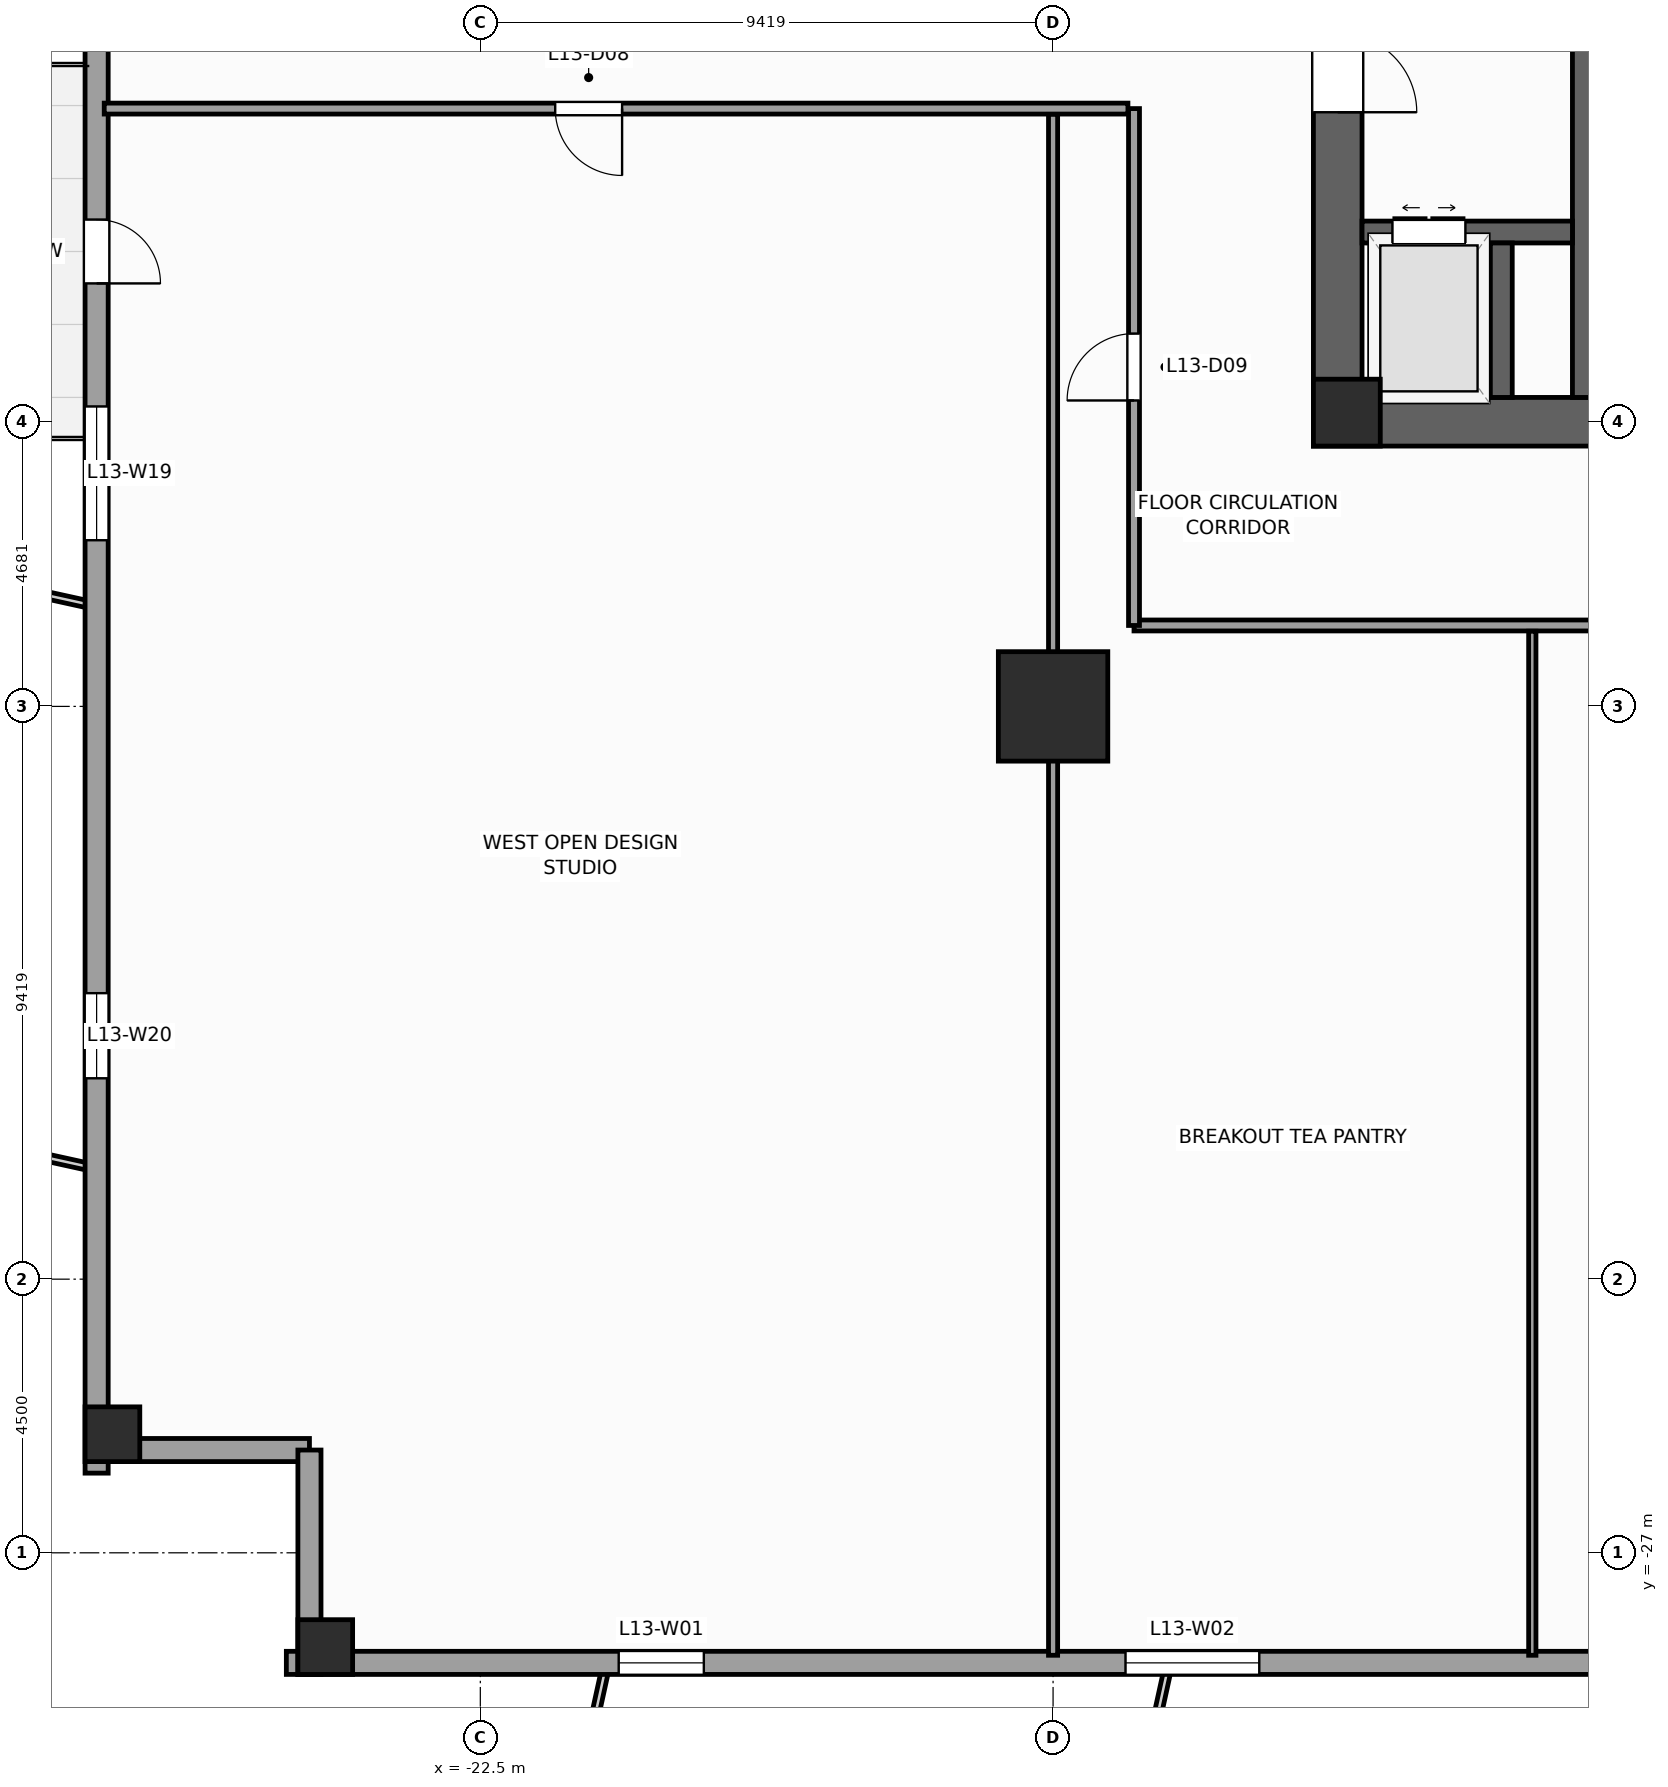
"""IFC4 building model, lengths in metres.
Left out: names, types, materials, properties, quantities, classifications, styles, units other than length and angle.
Written with IfcOpenShell. Run it as: python <this file> out.ifc"""

import sys

from ifc_helpers import new_model, si_unit, direction, frame, frame_2d, origin, origin_2d, place, context, subcontext, project, spatial, rectangle, extrude, source, transform, mapped, element, fill, save


model = new_model("IFC4")
c1 = context("Model", 3, precision=1e-05, world=origin(), true_north=direction((0.0, 1.0)))
c2 = subcontext(c1, "Body", "Model", "MODEL_VIEW")
j1 = project(units=[si_unit("LENGTHUNIT", "METRE"), si_unit("PLANEANGLEUNIT", "RADIAN")], contexts=[c1])
p1 = place(None, origin())
s1 = spatial("IfcSite", under=j1, at=p1, CompositionType="ELEMENT")
p2 = place(p1, origin())
s2 = spatial("IfcBuilding", under=s1, at=p2, CompositionType="ELEMENT")
p3 = place(p2, frame((0.0, 0.0, 58.0)))
s3 = spatial("IfcBuildingStorey", under=s2, at=p3, CompositionType="ELEMENT", Elevation=58.0)
p4 = place(p3, frame((-8.8, -8.4, 0.0), z_axis=(0.0, 0.0, 1.0), x_axis=(1.0, 0.0, 0.0)))
e1 = element("IfcWall", 1, at=p4, inside=s3, PredefinedType="SHEAR", context=c2, shape_type="SweptSolid", body=[
    extrude(rectangle(XDim=17.6, YDim=0.8, at=frame_2d((8.8, 0.0))), origin(), (0.0, 0.0, 1.0), 4.0),
])
p5 = place(p4, frame((8.15, 0.0, 0.0)))
e2 = element("IfcOpeningElement", 2, at=p5, cuts=e1, PredefinedType="OPENING", context=c2, shape_type="SweptSolid", body=[
    extrude(rectangle(XDim=1.3, YDim=2.2, at=frame_2d((0.65, 1.1))), frame((0.0, 0.41, 0.0), z_axis=(0.0, -1.0, 0.0), x_axis=(1.0, 0.0, 0.0)), (0.0, 0.0, 1.0), 0.82),
])
p6 = place(p3, frame((-8.4, -8.0, 0.0), z_axis=(0.0, 0.0, 1.0), x_axis=(0.0, 1.0, 0.0)))
e3 = element("IfcWall", 3, at=p6, inside=s3, PredefinedType="SHEAR", context=c2, shape_type="SweptSolid", body=[
    extrude(rectangle(XDim=16.0, YDim=0.8, at=frame_2d((8.0, 0.0))), origin(), (0.0, 0.0, 1.0), 4.0),
])
p7 = place(p6, frame((4.69, 0.0, 0.0)))
e4 = element("IfcOpeningElement", 4, at=p7, cuts=e3, PredefinedType="OPENING", context=c2, shape_type="SweptSolid", body=[
    extrude(rectangle(XDim=1.3, YDim=2.2, at=frame_2d((0.65, 1.1))), frame((0.0, 0.41, 0.0), z_axis=(0.0, -1.0, 0.0), x_axis=(1.0, 0.0, 0.0)), (0.0, 0.0, 1.0), 0.82),
])
p8 = place(p3, frame((-4.36, -8.0, 0.0), z_axis=(0.0, 0.0, 1.0), x_axis=(0.0, 1.0, 0.0)))
e5 = element("IfcWall", 5, at=p8, inside=s3, PredefinedType="SHEAR", context=c2, shape_type="SweptSolid", body=[
    extrude(rectangle(XDim=16.0, YDim=0.36, at=frame_2d((8.0, 0.0))), origin(), (0.0, 0.0, 1.0), 4.0),
])
p9 = place(p3, frame((-8.0, -5.28, 0.0), z_axis=(0.0, 0.0, 1.0), x_axis=(1.0, 0.0, 0.0)))
e6 = element("IfcWall", 6, at=p9, inside=s3, PredefinedType="SHEAR", context=c2, shape_type="SweptSolid", body=[
    extrude(rectangle(XDim=3.46, YDim=0.36, at=frame_2d((1.73, 0.0))), origin(), (0.0, 0.0, 1.0), 4.0),
])
p10 = place(p9, frame((0.5, 0.0, 0.0)))
e7 = element("IfcOpeningElement", 7, at=p10, cuts=e6, PredefinedType="OPENING", context=c2, shape_type="SweptSolid", body=[
    extrude(rectangle(XDim=1.2, YDim=2.25, at=frame_2d((0.6, 1.125))), frame((0.0, 0.19, 0.0), z_axis=(0.0, -1.0, 0.0), x_axis=(1.0, 0.0, 0.0)), (0.0, 0.0, 1.0), 0.38),
])
p11 = place(p3, frame((-5.71, -8.0, 0.0), z_axis=(0.0, 0.0, 1.0), x_axis=(0.0, 1.0, 0.0)))
e8 = element("IfcWall", 8, at=p11, inside=s3, PredefinedType="SHEAR", context=c2, shape_type="SweptSolid", body=[
    extrude(rectangle(XDim=2.54, YDim=0.36, at=frame_2d((1.27, 0.0))), origin(), (0.0, 0.0, 1.0), 4.0),
])
m1 = source(origin(), c2, "Body", "SweptSolid", [
    extrude(rectangle(XDim=1.1, YDim=1.1, at=origin_2d()), origin(), (0.0, 0.0, 1.0), 4.0),
])
p12 = place(p3, frame((-8.25, -8.25, 0.0), z_axis=(0.0, 0.0, 1.0), x_axis=(1.0, 0.0, 0.0)))
e9 = element("IfcColumn", 9, at=p12, inside=s3, PredefinedType="PILASTER", context=c2, shape_type="MappedRepresentation", body=[
    mapped(m1, transform((0.0, 0.0, 0.0), scale=1.0)),
])
m2 = source(origin(), c2, "Body", "SweptSolid", [
    extrude(rectangle(XDim=1.8, YDim=1.8, at=origin_2d()), origin(), (0.0, 0.0, 1.0), 4.0),
])
p13 = place(p3, frame((-13.081, -13.081, 0.0), z_axis=(0.0, 0.0, 1.0), x_axis=(1.0, 0.0, 0.0)))
e10 = element("IfcColumn", 10, at=p13, inside=s3, PredefinedType="COLUMN", context=c2, shape_type="MappedRepresentation", body=[
    mapped(m2, transform((0.0, 0.0, 0.0), scale=1.0)),
])
m3 = source(origin(), c2, "Body", "SweptSolid", [
    extrude(rectangle(XDim=0.9, YDim=0.9, at=origin_2d()), origin(), (0.0, 0.0, 1.0), 4.0),
])
for number, where, z_axis, x_axis in (
    (11, (-25.05, -28.55, 0.0), (0.0, 0.0, 1.0), (1.0, 0.0, 0.0)),
    (12, (-28.55, -25.05, 0.0), (0.0, 0.0, 1.0), (1.0, 0.0, 0.0)),
):
    element("IfcColumn", number, at=place(p3, frame(where, z_axis=z_axis, x_axis=x_axis)), inside=s3, PredefinedType="COLUMN", context=c2, shape_type="MappedRepresentation", body=[
        mapped(m3, transform((0.0, 0.0, 0.0), scale=1.0)),
    ])
p14 = place(p3, frame((-25.69, -28.81, 0.0), z_axis=(0.0, 0.0, 1.0), x_axis=(1.0, 0.0, 0.0)))
e13 = element("IfcWall", 13, at=p14, inside=s3, PredefinedType="STANDARD", context=c2, shape_type="SweptSolid", body=[
    extrude(rectangle(XDim=51.38, YDim=0.38, at=frame_2d((25.69, 0.0))), origin(), (0.0, 0.0, 1.0), 3.12),
])
p15 = place(p14, frame((5.466, 0.0, 0.49)))
e14 = element("IfcOpeningElement", 14, at=p15, cuts=e13, PredefinedType="OPENING", context=c2, shape_type="SweptSolid", body=[
    extrude(rectangle(XDim=1.4, YDim=2.4, at=frame_2d((0.7, 1.2))), frame((0.0, 0.2, 0.0), z_axis=(0.0, -1.0, 0.0), x_axis=(1.0, 0.0, 0.0)), (0.0, 0.0, 1.0), 0.4),
])
p16 = place(p14, frame((13.8, 0.0, 0.49)))
e15 = element("IfcOpeningElement", 15, at=p16, cuts=e13, PredefinedType="OPENING", context=c2, shape_type="SweptSolid", body=[
    extrude(rectangle(XDim=2.2, YDim=2.4, at=frame_2d((1.1, 1.2))), frame((0.0, 0.2, 0.0), z_axis=(0.0, -1.0, 0.0), x_axis=(1.0, 0.0, 0.0)), (0.0, 0.0, 1.0), 0.4),
])
p17 = place(p14, frame((22.062, 0.0, 0.49)))
e16 = element("IfcOpeningElement", 16, at=p17, cuts=e13, PredefinedType="OPENING", context=c2, shape_type="SweptSolid", body=[
    extrude(rectangle(XDim=2.2, YDim=2.4, at=frame_2d((1.1, 1.2))), frame((0.0, 0.2, 0.0), z_axis=(0.0, -1.0, 0.0), x_axis=(1.0, 0.0, 0.0)), (0.0, 0.0, 1.0), 0.4),
])
p18 = place(p14, frame((33.838, 0.0, 0.49)))
e17 = element("IfcOpeningElement", 17, at=p18, cuts=e13, PredefinedType="OPENING", context=c2, shape_type="SweptSolid", body=[
    extrude(rectangle(XDim=2.2, YDim=2.4, at=frame_2d((1.1, 1.2))), frame((0.0, 0.2, 0.0), z_axis=(0.0, -1.0, 0.0), x_axis=(1.0, 0.0, 0.0)), (0.0, 0.0, 1.0), 0.4),
])
p19 = place(p14, frame((43.487, 0.0, 0.49)))
e18 = element("IfcOpeningElement", 18, at=p19, cuts=e13, PredefinedType="OPENING", context=c2, shape_type="SweptSolid", body=[
    extrude(rectangle(XDim=1.4, YDim=2.4, at=frame_2d((0.7, 1.2))), frame((0.0, 0.2, 0.0), z_axis=(0.0, -1.0, 0.0), x_axis=(1.0, 0.0, 0.0)), (0.0, 0.0, 1.0), 0.4),
])
p20 = place(p3, frame((-28.81, 25.69, 0.0), z_axis=(0.0, 0.0, 1.0), x_axis=(0.0, -1.0, 0.0)))
e19 = element("IfcWall", 19, at=p20, inside=s3, PredefinedType="STANDARD", context=c2, shape_type="SweptSolid", body=[
    extrude(rectangle(XDim=51.38, YDim=0.38, at=frame_2d((25.69, 0.0))), origin(), (0.0, 0.0, 1.0), 3.12),
])
p21 = place(p20, frame((30.765, 0.0, 0.0)))
e20 = element("IfcOpeningElement", 20, at=p21, cuts=e19, PredefinedType="OPENING", context=c2, shape_type="SweptSolid", body=[
    extrude(rectangle(XDim=1.05, YDim=2.25, at=frame_2d((0.525, 1.125))), frame((0.0, 0.2, 0.0), z_axis=(0.0, -1.0, 0.0), x_axis=(1.0, 0.0, 0.0)), (0.0, 0.0, 1.0), 0.4),
])
p22 = place(p20, frame((5.466, 0.0, 0.49)))
e21 = element("IfcOpeningElement", 21, at=p22, cuts=e19, PredefinedType="OPENING", context=c2, shape_type="SweptSolid", body=[
    extrude(rectangle(XDim=1.4, YDim=2.4, at=frame_2d((0.7, 1.2))), frame((0.0, 0.2, 0.0), z_axis=(0.0, -1.0, 0.0), x_axis=(1.0, 0.0, 0.0)), (0.0, 0.0, 1.0), 0.4),
])
p23 = place(p20, frame((13.8, 0.0, 0.49)))
e22 = element("IfcOpeningElement", 22, at=p23, cuts=e19, PredefinedType="OPENING", context=c2, shape_type="SweptSolid", body=[
    extrude(rectangle(XDim=2.2, YDim=2.4, at=frame_2d((1.1, 1.2))), frame((0.0, 0.2, 0.0), z_axis=(0.0, -1.0, 0.0), x_axis=(1.0, 0.0, 0.0)), (0.0, 0.0, 1.0), 0.4),
])
p24 = place(p20, frame((22.062, 0.0, 0.49)))
e23 = element("IfcOpeningElement", 23, at=p24, cuts=e19, PredefinedType="OPENING", context=c2, shape_type="SweptSolid", body=[
    extrude(rectangle(XDim=2.2, YDim=2.4, at=frame_2d((1.1, 1.2))), frame((0.0, 0.2, 0.0), z_axis=(0.0, -1.0, 0.0), x_axis=(1.0, 0.0, 0.0)), (0.0, 0.0, 1.0), 0.4),
])
p25 = place(p20, frame((33.838, 0.0, 0.49)))
e24 = element("IfcOpeningElement", 24, at=p25, cuts=e19, PredefinedType="OPENING", context=c2, shape_type="SweptSolid", body=[
    extrude(rectangle(XDim=2.2, YDim=2.4, at=frame_2d((1.1, 1.2))), frame((0.0, 0.2, 0.0), z_axis=(0.0, -1.0, 0.0), x_axis=(1.0, 0.0, 0.0)), (0.0, 0.0, 1.0), 0.4),
])
p26 = place(p20, frame((43.487, 0.0, 0.49)))
e25 = element("IfcOpeningElement", 25, at=p26, cuts=e19, PredefinedType="OPENING", context=c2, shape_type="SweptSolid", body=[
    extrude(rectangle(XDim=1.4, YDim=2.4, at=frame_2d((0.7, 1.2))), frame((0.0, 0.2, 0.0), z_axis=(0.0, -1.0, 0.0), x_axis=(1.0, 0.0, 0.0)), (0.0, 0.0, 1.0), 0.4),
])
p27 = place(p3, frame((-28.81, -25.31, 0.0), z_axis=(0.0, 0.0, 1.0), x_axis=(1.0, 0.0, 0.0)))
e26 = element("IfcWall", 26, at=p27, inside=s3, PredefinedType="STANDARD", context=c2, shape_type="SweptSolid", body=[
    extrude(rectangle(XDim=3.5, YDim=0.38, at=frame_2d((1.75, 0.0))), origin(), (0.0, 0.0, 1.0), 3.72),
])
p28 = place(p3, frame((-25.31, -25.31, 0.0), z_axis=(0.0, 0.0, 1.0), x_axis=(0.0, -1.0, 0.0)))
e27 = element("IfcWall", 27, at=p28, inside=s3, PredefinedType="STANDARD", context=c2, shape_type="SweptSolid", body=[
    extrude(rectangle(XDim=3.69, YDim=0.38, at=frame_2d((1.845, 0.0))), origin(), (0.0, 0.0, 1.0), 3.72),
])
p29 = place(p3, frame((-11.75, -11.75, 0.0), z_axis=(0.0, 0.0, 1.0), x_axis=(1.0, 0.0, 0.0)))
e28 = element("IfcWall", 28, at=p29, inside=s3, PredefinedType="PARTITIONING", context=c2, shape_type="SweptSolid", body=[
    extrude(rectangle(XDim=12.7, YDim=0.18, at=frame_2d((6.35, 0.0))), origin(), (0.0, 0.0, 1.0), 3.72),
])
p30 = place(p3, frame((-11.75, -11.75, 0.0), z_axis=(0.0, 0.0, 1.0), x_axis=(0.0, 1.0, 0.0)))
e29 = element("IfcWall", 29, at=p30, inside=s3, PredefinedType="PARTITIONING", context=c2, shape_type="SweptSolid", body=[
    extrude(rectangle(XDim=8.5, YDim=0.18, at=frame_2d((4.25, 0.0))), origin(), (0.0, 0.0, 1.0), 3.72),
])
p31 = place(p30, frame((3.7, 0.0, 0.0)))
e30 = element("IfcOpeningElement", 30, at=p31, cuts=e29, PredefinedType="OPENING", context=c2, shape_type="SweptSolid", body=[
    extrude(rectangle(XDim=1.1, YDim=2.2, at=frame_2d((0.55, 1.1))), frame((0.0, 0.1, 0.0), z_axis=(0.0, -1.0, 0.0), x_axis=(1.0, 0.0, 0.0)), (0.0, 0.0, 1.0), 0.2),
])
p32 = place(p3, frame((-28.685, -3.25, 0.0), z_axis=(0.0, 0.0, 1.0), x_axis=(1.0, 0.0, 0.0)))
e31 = element("IfcWall", 31, at=p32, inside=s3, PredefinedType="PARTITIONING", context=c2, shape_type="SweptSolid", body=[
    extrude(rectangle(XDim=16.835, YDim=0.18, at=frame_2d((8.417, 0.0))), origin(), (0.0, 0.0, 1.0), 3.72),
])
p33 = place(p32, frame((7.417, 0.0, 0.0)))
e32 = element("IfcOpeningElement", 32, at=p33, cuts=e31, PredefinedType="OPENING", context=c2, shape_type="SweptSolid", body=[
    extrude(rectangle(XDim=1.1, YDim=2.2, at=frame_2d((0.55, 1.1))), frame((0.0, 0.1, 0.0), z_axis=(0.0, -1.0, 0.0), x_axis=(1.0, 0.0, 0.0)), (0.0, 0.0, 1.0), 0.2),
])
p34 = place(p3, frame((-13.081, -28.685, 0.0), z_axis=(0.0, 0.0, 1.0), x_axis=(0.0, 1.0, 0.0)))
e33 = element("IfcWall", 33, at=p34, inside=s3, PredefinedType="PARTITIONING", context=c2, shape_type="SweptSolid", body=[
    extrude(rectangle(XDim=25.34, YDim=0.15, at=frame_2d((12.67, 0.0))), origin(), (0.0, 0.0, 1.0), 2.712),
])
p35 = place(p3, frame((-5.2, -28.685, 0.0), z_axis=(0.0, 0.0, 1.0), x_axis=(0.0, 1.0, 0.0)))
e34 = element("IfcWall", 34, at=p35, inside=s3, PredefinedType="PARTITIONING", context=c2, shape_type="SweptSolid", body=[
    extrude(rectangle(XDim=16.84, YDim=0.12, at=frame_2d((8.42, 0.0))), origin(), (0.0, 0.0, 1.0), 3.72),
])
m4 = source(origin(), c2, "Body", "SweptSolid", [
    extrude(rectangle(XDim=1.4, YDim=2.4, at=frame_2d((0.7, 1.2))), frame((0.0, 0.03, 0.0), z_axis=(0.0, -1.0, 0.0), x_axis=(1.0, 0.0, 0.0)), (0.0, 0.0, 1.0), 0.06),
])
p36 = place(p15, origin())
e35 = element("IfcWindow", 35, at=p36, inside=s3, PartitioningType="SINGLE_PANEL", PredefinedType="WINDOW", context=c2, shape_type="MappedRepresentation", body=[
    mapped(m4, transform((0.0, 0.0, 0.0), scale=1.0)),
])
fill(e14, e35)
m5 = source(origin(), c2, "Body", "SweptSolid", [
    extrude(rectangle(XDim=2.2, YDim=2.4, at=frame_2d((1.1, 1.2))), frame((0.0, 0.03, 0.0), z_axis=(0.0, -1.0, 0.0), x_axis=(1.0, 0.0, 0.0)), (0.0, 0.0, 1.0), 0.06),
])
p37 = place(p16, origin())
e36 = element("IfcWindow", 36, at=p37, inside=s3, PartitioningType="SINGLE_PANEL", PredefinedType="WINDOW", context=c2, shape_type="MappedRepresentation", body=[
    mapped(m5, transform((0.0, 0.0, 0.0), scale=1.0)),
])
fill(e15, e36)
m6 = source(origin(), c2, "Body", "SweptSolid", [
    extrude(rectangle(XDim=1.05, YDim=2.25, at=frame_2d((0.525, 1.125))), frame((0.0, 0.025, 0.0), z_axis=(0.0, -1.0, 0.0), x_axis=(1.0, 0.0, 0.0)), (0.0, 0.0, 1.0), 0.05),
])
p38 = place(p21, origin())
e37 = element("IfcDoor", 37, at=p38, inside=s3, OperationType="SINGLE_SWING_RIGHT", PredefinedType="DOOR", context=c2, shape_type="MappedRepresentation", body=[
    mapped(m6, transform((0.0, 0.0, 0.0), scale=1.0)),
])
fill(e20, e37)
p39 = place(p25, origin())
e38 = element("IfcWindow", 38, at=p39, inside=s3, PartitioningType="SINGLE_PANEL", PredefinedType="WINDOW", context=c2, shape_type="MappedRepresentation", body=[
    mapped(m5, transform((0.0, 0.0, 0.0), scale=1.0)),
])
fill(e24, e38)
p40 = place(p26, origin())
e39 = element("IfcWindow", 39, at=p40, inside=s3, PartitioningType="SINGLE_PANEL", PredefinedType="WINDOW", context=c2, shape_type="MappedRepresentation", body=[
    mapped(m4, transform((0.0, 0.0, 0.0), scale=1.0)),
])
fill(e25, e39)
m7 = source(origin(), c2, "Body", "SweptSolid", [
    extrude(rectangle(XDim=1.3, YDim=2.2, at=frame_2d((0.65, 1.1))), frame((0.0, 0.025, 0.0), z_axis=(0.0, -1.0, 0.0), x_axis=(1.0, 0.0, 0.0)), (0.0, 0.0, 1.0), 0.05),
])
p41 = place(p7, frame((1.3, 0.0, 0.0), z_axis=(0.0, 0.0, 1.0), x_axis=(-1.0, 0.0, 0.0)))
e40 = element("IfcDoor", 40, at=p41, inside=s3, OperationType="SINGLE_SWING_LEFT", PredefinedType="DOOR", context=c2, shape_type="MappedRepresentation", body=[
    mapped(m7, transform((0.0, 0.0, 0.0), scale=1.0)),
])
fill(e4, e40)
m8 = source(origin(), c2, "Body", "SweptSolid", [
    extrude(rectangle(XDim=1.2, YDim=2.25, at=frame_2d((0.6, 1.125))), frame((0.0, 0.025, 0.0), z_axis=(0.0, -1.0, 0.0), x_axis=(1.0, 0.0, 0.0)), (0.0, 0.0, 1.0), 0.05),
])
p42 = place(p10, origin())
e41 = element("IfcDoor", 41, at=p42, inside=s3, OperationType="DOUBLE_DOOR_SLIDING", PredefinedType="DOOR", context=c2, shape_type="MappedRepresentation", body=[
    mapped(m8, transform((0.0, 0.0, 0.0), scale=1.0)),
])
fill(e7, e41)
m9 = source(origin(), c2, "Body", "SweptSolid", [
    extrude(rectangle(XDim=1.1, YDim=2.2, at=frame_2d((0.55, 1.1))), frame((0.0, 0.025, 0.0), z_axis=(0.0, -1.0, 0.0), x_axis=(1.0, 0.0, 0.0)), (0.0, 0.0, 1.0), 0.05),
])
p43 = place(p33, frame((1.1, 0.0, 0.0), z_axis=(0.0, 0.0, 1.0), x_axis=(-1.0, 0.0, 0.0)))
e42 = element("IfcDoor", 42, at=p43, inside=s3, OperationType="SINGLE_SWING_RIGHT", PredefinedType="DOOR", context=c2, shape_type="MappedRepresentation", body=[
    mapped(m9, transform((0.0, 0.0, 0.0), scale=1.0)),
])
fill(e32, e42)
p44 = place(p31, origin())
e43 = element("IfcDoor", 43, at=p44, inside=s3, OperationType="SINGLE_SWING_LEFT", PredefinedType="DOOR", context=c2, shape_type="MappedRepresentation", body=[
    mapped(m9, transform((0.0, 0.0, 0.0), scale=1.0)),
])
fill(e30, e43)
save(model, sys.argv[1])
